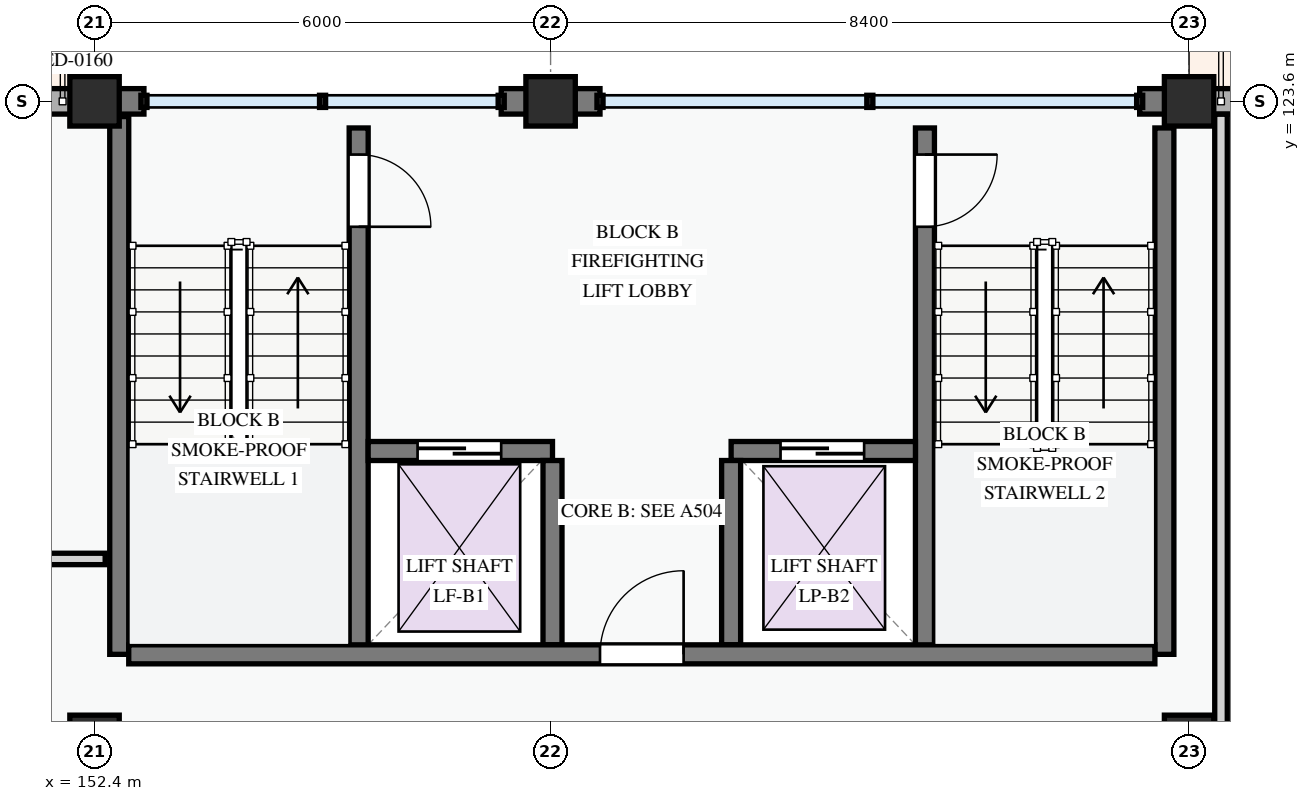
"""IFC4 building model, lengths in metres.
Left out: names, types, materials, properties, quantities, classifications, styles, units other than length and angle.
Written with IfcOpenShell. Run it as: python <this file> out.ifc"""

import sys

from ifc_helpers import new_model, si_unit, direction, frame, frame_2d, origin, origin_2d, place, context, subcontext, project, spatial, rectangle, extrude, element, fill, save


model = new_model("IFC4")
c1 = context("Model", 3, precision=1e-05, world=origin(), true_north=direction((0.0, 1.0)))
c2 = subcontext(c1, "Body", "Model", "MODEL_VIEW")
j1 = project(units=[si_unit("LENGTHUNIT", "METRE"), si_unit("PLANEANGLEUNIT", "RADIAN")], contexts=[c1])
p1 = place(None, origin())
s1 = spatial("IfcSite", under=j1, at=p1, CompositionType="ELEMENT")
p2 = place(p1, origin())
s2 = spatial("IfcBuilding", under=s1, at=p2, CompositionType="ELEMENT")
p3 = place(p2, frame((0.0, 0.0, 14.7)))
s3 = spatial("IfcBuildingStorey", under=s2, at=p3, CompositionType="ELEMENT", Elevation=14.7)
for number, where, z_axis, x_axis in (
    (1, (152.4, 115.2, 0.0), (0.0, 0.0, 1.0), (1.0, 0.0, 0.0)),
    (2, (152.4, 123.6, 0.0), (0.0, 0.0, 1.0), (1.0, 0.0, 0.0)),
    (3, (158.4, 123.6, 0.0), (0.0, 0.0, 1.0), (1.0, 0.0, 0.0)),
    (4, (166.8, 115.2, 0.0), (0.0, 0.0, 1.0), (1.0, 0.0, 0.0)),
    (5, (166.8, 123.6, 0.0), (0.0, 0.0, 1.0), (1.0, 0.0, 0.0)),
):
    element("IfcColumn", number, at=place(p3, frame(where, z_axis=z_axis, x_axis=x_axis)), inside=s3, PredefinedType="COLUMN", context=c2, shape_type="SweptSolid", body=[
        extrude(rectangle(XDim=0.65, YDim=0.65, at=origin_2d()), origin(), (0.0, 0.0, 1.0), 3.3),
    ])
p4 = place(p3, frame((174.0, 123.6, 0.0), z_axis=(0.0, 0.0, 1.0), x_axis=(-1.0, 0.0, 0.0)))
e6 = element("IfcWall", 6, at=p4, inside=s3, PredefinedType="STANDARD", context=c2, shape_type="SweptSolid", body=[
    extrude(rectangle(XDim=7.2, YDim=0.335, at=frame_2d((3.6, 0.0))), origin(), (0.0, 0.0, 1.0), 2.345),
])
p5 = place(p4, frame((0.62, 0.0, 0.0)))
e7 = element("IfcOpeningElement", 7, at=p5, cuts=e6, PredefinedType="OPENING", context=c2, shape_type="SweptSolid", body=[
    extrude(rectangle(XDim=1.05, YDim=2.15, at=frame_2d((0.525, 1.075))), frame((0.0, 0.177, 0.0), z_axis=(0.0, -1.0, 0.0), x_axis=(1.0, 0.0, 0.0)), (0.0, 0.0, 1.0), 0.355),
])
p6 = place(p4, frame((2.47, 0.0, 0.78)))
e8 = element("IfcOpeningElement", 8, at=p6, cuts=e6, PredefinedType="OPENING", context=c2, shape_type="SweptSolid", body=[
    extrude(rectangle(XDim=1.1, YDim=1.3, at=frame_2d((0.55, 0.65))), frame((0.0, 0.177, 0.0), z_axis=(0.0, -1.0, 0.0), x_axis=(1.0, 0.0, 0.0)), (0.0, 0.0, 1.0), 0.355),
])
p7 = place(p4, frame((4.955, 0.0, 0.78)))
e9 = element("IfcOpeningElement", 9, at=p7, cuts=e6, PredefinedType="OPENING", context=c2, shape_type="SweptSolid", body=[
    extrude(rectangle(XDim=1.05, YDim=1.2, at=frame_2d((0.525, 0.6))), frame((0.0, 0.177, 0.0), z_axis=(0.0, -1.0, 0.0), x_axis=(1.0, 0.0, 0.0)), (0.0, 0.0, 1.0), 0.355),
])
for number, where, z_axis, x_axis in (
    (10, (166.8, 123.6, 0.0), (0.0, 0.0, 1.0), (-1.0, 0.0, 0.0)),
    (11, (159.05, 123.6, 0.0), (0.0, 0.0, 1.0), (-1.0, 0.0, 0.0)),
):
    element("IfcWall", number, at=place(p3, frame(where, z_axis=z_axis, x_axis=x_axis)), inside=s3, PredefinedType="STANDARD", context=c2, shape_type="SweptSolid", body=[
        extrude(rectangle(XDim=0.65, YDim=0.335, at=frame_2d((0.325, 0.0))), origin(), (0.0, 0.0, 1.0), 3.04),
    ])
p8 = place(p3, frame((158.4, 123.6, 0.0), z_axis=(0.0, 0.0, 1.0), x_axis=(-1.0, 0.0, 0.0)))
e12 = element("IfcWall", 12, at=p8, inside=s3, PredefinedType="STANDARD", context=c2, shape_type="SweptSolid", body=[
    extrude(rectangle(XDim=0.65, YDim=0.335, at=frame_2d((0.325, 0.0))), origin(), (0.0, 0.0, 1.0), 3.04),
])
p9 = place(p3, frame((153.05, 123.6, 0.0), z_axis=(0.0, 0.0, 1.0), x_axis=(-1.0, 0.0, 0.0)))
e13 = element("IfcWall", 13, at=p9, inside=s3, PredefinedType="STANDARD", context=c2, shape_type="SweptSolid", body=[
    extrude(rectangle(XDim=0.65, YDim=0.335, at=frame_2d((0.325, 0.0))), origin(), (0.0, 0.0, 1.0), 3.04),
])
p10 = place(p3, frame((152.4, 123.6, 0.0), z_axis=(0.0, 0.0, 1.0), x_axis=(-1.0, 0.0, 0.0)))
e14 = element("IfcWall", 14, at=p10, inside=s3, PredefinedType="STANDARD", context=c2, shape_type="SweptSolid", body=[
    extrude(rectangle(XDim=8.4, YDim=0.335, at=frame_2d((4.2, 0.0))), origin(), (0.0, 0.0, 1.0), 2.345),
])
p11 = place(p10, frame((0.62, 0.0, 0.0)))
e15 = element("IfcOpeningElement", 15, at=p11, cuts=e14, PredefinedType="OPENING", context=c2, shape_type="SweptSolid", body=[
    extrude(rectangle(XDim=1.25, YDim=2.2, at=frame_2d((0.625, 1.1))), frame((0.0, 0.177, 0.0), z_axis=(0.0, -1.0, 0.0), x_axis=(1.0, 0.0, 0.0)), (0.0, 0.0, 1.0), 0.355),
])
p12 = place(p10, frame((3.052, 0.0, 0.78)))
e16 = element("IfcOpeningElement", 16, at=p12, cuts=e14, PredefinedType="OPENING", context=c2, shape_type="SweptSolid", body=[
    extrude(rectangle(XDim=0.95, YDim=1.15, at=frame_2d((0.475, 0.575))), frame((0.0, 0.177, 0.0), z_axis=(0.0, -1.0, 0.0), x_axis=(1.0, 0.0, 0.0)), (0.0, 0.0, 1.0), 0.355),
])
p13 = place(p10, frame((5.843, 0.0, 0.78)))
e17 = element("IfcOpeningElement", 17, at=p13, cuts=e14, PredefinedType="OPENING", context=c2, shape_type="SweptSolid", body=[
    extrude(rectangle(XDim=1.52, YDim=1.42, at=frame_2d((0.76, 0.71))), frame((0.0, 0.177, 0.0), z_axis=(0.0, -1.0, 0.0), x_axis=(1.0, 0.0, 0.0)), (0.0, 0.0, 1.0), 0.355),
])
p14 = place(p3, frame((155.875, 123.25, 0.0), z_axis=(0.0, 0.0, 1.0), x_axis=(0.0, -1.0, 0.0)))
e18 = element("IfcWall", 18, at=p14, inside=s3, PredefinedType="SHEAR", context=c2, shape_type="SweptSolid", body=[
    extrude(rectangle(XDim=6.925, YDim=0.25, at=frame_2d((3.462, 0.0))), origin(), (0.0, 0.0, 1.0), 3.0),
])
p15 = place(p14, frame((0.35, 0.0, 0.0)))
e19 = element("IfcOpeningElement", 19, at=p15, cuts=e18, PredefinedType="OPENING", context=c2, shape_type="SweptSolid", body=[
    extrude(rectangle(XDim=0.95, YDim=2.1, at=frame_2d((0.475, 1.05))), frame((0.0, 0.135, 0.0), z_axis=(0.0, -1.0, 0.0), x_axis=(1.0, 0.0, 0.0)), (0.0, 0.0, 1.0), 0.27),
])
p16 = place(p3, frame((152.725, 123.4, 0.0), z_axis=(0.0, 0.0, 1.0), x_axis=(0.0, -1.0, 0.0)))
e20 = element("IfcWall", 20, at=p16, inside=s3, PredefinedType="SHEAR", context=c2, shape_type="SweptSolid", body=[
    extrude(rectangle(XDim=7.075, YDim=0.25, at=frame_2d((3.538, 0.0))), origin(), (0.0, 0.0, 1.0), 3.0),
])
p17 = place(p3, frame((166.475, 123.25, 0.0), z_axis=(0.0, 0.0, 1.0), x_axis=(0.0, -1.0, 0.0)))
e21 = element("IfcWall", 21, at=p17, inside=s3, PredefinedType="SHEAR", context=c2, shape_type="SweptSolid", body=[
    extrude(rectangle(XDim=6.925, YDim=0.25, at=frame_2d((3.462, 0.0))), origin(), (0.0, 0.0, 1.0), 3.0),
])
p18 = place(p3, frame((163.325, 123.25, 0.0), z_axis=(0.0, 0.0, 1.0), x_axis=(0.0, -1.0, 0.0)))
e22 = element("IfcWall", 22, at=p18, inside=s3, PredefinedType="SHEAR", context=c2, shape_type="SweptSolid", body=[
    extrude(rectangle(XDim=6.925, YDim=0.25, at=frame_2d((3.462, 0.0))), origin(), (0.0, 0.0, 1.0), 3.0),
])
p19 = place(p18, frame((0.35, 0.0, 0.0)))
e23 = element("IfcOpeningElement", 23, at=p19, cuts=e22, PredefinedType="OPENING", context=c2, shape_type="SweptSolid", body=[
    extrude(rectangle(XDim=0.95, YDim=2.1, at=frame_2d((0.475, 1.05))), frame((0.0, 0.135, 0.0), z_axis=(0.0, -1.0, 0.0), x_axis=(1.0, 0.0, 0.0)), (0.0, 0.0, 1.0), 0.27),
])
p20 = place(p3, frame((156.0, 119.0, 0.0), z_axis=(0.0, 0.0, 1.0), x_axis=(1.0, 0.0, 0.0)))
e24 = element("IfcWall", 24, at=p20, inside=s3, PredefinedType="SHEAR", context=c2, shape_type="SweptSolid", body=[
    extrude(rectangle(XDim=2.425, YDim=0.25, at=frame_2d((1.212, 0.0))), origin(), (0.0, 0.0, 1.0), 3.0),
])
p21 = place(p20, frame((0.65, 0.0, 0.0)))
e25 = element("IfcOpeningElement", 25, at=p21, cuts=e24, PredefinedType="OPENING", context=c2, shape_type="SweptSolid", body=[
    extrude(rectangle(XDim=1.1, YDim=2.15, at=frame_2d((0.55, 1.075))), frame((0.0, 0.135, 0.0), z_axis=(0.0, -1.0, 0.0), x_axis=(1.0, 0.0, 0.0)), (0.0, 0.0, 1.0), 0.27),
])
p22 = place(p3, frame((160.775, 119.0, 0.0), z_axis=(0.0, 0.0, 1.0), x_axis=(1.0, 0.0, 0.0)))
e26 = element("IfcWall", 26, at=p22, inside=s3, PredefinedType="SHEAR", context=c2, shape_type="SweptSolid", body=[
    extrude(rectangle(XDim=2.425, YDim=0.25, at=frame_2d((1.212, 0.0))), origin(), (0.0, 0.0, 1.0), 3.0),
])
p23 = place(p22, frame((0.65, 0.0, 0.0)))
e27 = element("IfcOpeningElement", 27, at=p23, cuts=e26, PredefinedType="OPENING", context=c2, shape_type="SweptSolid", body=[
    extrude(rectangle(XDim=1.1, YDim=2.15, at=frame_2d((0.55, 1.075))), frame((0.0, 0.135, 0.0), z_axis=(0.0, -1.0, 0.0), x_axis=(1.0, 0.0, 0.0)), (0.0, 0.0, 1.0), 0.27),
])
for number, where, z_axis, x_axis in (
    (28, (158.425, 118.875, 0.0), (0.0, 0.0, 1.0), (0.0, -1.0, 0.0)),
    (29, (160.775, 118.875, 0.0), (0.0, 0.0, 1.0), (0.0, -1.0, 0.0)),
):
    element("IfcWall", number, at=place(p3, frame(where, z_axis=z_axis, x_axis=x_axis)), inside=s3, PredefinedType="SHEAR", context=c2, shape_type="SweptSolid", body=[
        extrude(rectangle(XDim=2.425, YDim=0.25, at=frame_2d((1.212, 0.0))), origin(), (0.0, 0.0, 1.0), 3.0),
    ])
p24 = place(p3, frame((152.85, 116.325, 0.0), z_axis=(0.0, 0.0, 1.0), x_axis=(1.0, 0.0, 0.0)))
e30 = element("IfcWall", 30, at=p24, inside=s3, PredefinedType="SHEAR", context=c2, shape_type="SweptSolid", body=[
    extrude(rectangle(XDim=13.5, YDim=0.25, at=frame_2d((6.75, 0.0))), origin(), (0.0, 0.0, 1.0), 3.0),
])
p25 = place(p24, frame((6.2, 0.0, 0.0)))
e31 = element("IfcOpeningElement", 31, at=p25, cuts=e30, PredefinedType="OPENING", context=c2, shape_type="SweptSolid", body=[
    extrude(rectangle(XDim=1.1, YDim=2.15, at=frame_2d((0.55, 1.075))), frame((0.0, 0.135, 0.0), z_axis=(0.0, -1.0, 0.0), x_axis=(1.0, 0.0, 0.0)), (0.0, 0.0, 1.0), 0.27),
])
p26 = place(p3, frame((80.57, 117.58, 0.0), z_axis=(0.0, 0.0, 1.0), x_axis=(1.0, 0.0, 0.0)))
e32 = element("IfcWall", 32, at=p26, inside=s3, PredefinedType="PARTITIONING", context=c2, shape_type="SweptSolid", body=[
    extrude(rectangle(XDim=71.97, YDim=0.15, at=frame_2d((35.985, 0.0))), origin(), (0.0, 0.0, 1.0), 3.0),
])
p27 = place(p26, frame((9.279, 0.0, 0.0)))
e33 = element("IfcOpeningElement", 33, at=p27, cuts=e32, PredefinedType="OPENING", context=c2, shape_type="SweptSolid", body=[
    extrude(rectangle(XDim=0.92, YDim=2.1, at=frame_2d((0.46, 1.05))), frame((0.0, 0.085, 0.0), z_axis=(0.0, -1.0, 0.0), x_axis=(1.0, 0.0, 0.0)), (0.0, 0.0, 1.0), 0.17),
])
p28 = place(p26, frame((23.985, 0.0, 0.0)))
e34 = element("IfcOpeningElement", 34, at=p28, cuts=e32, PredefinedType="OPENING", context=c2, shape_type="SweptSolid", body=[
    extrude(rectangle(XDim=0.96, YDim=2.12, at=frame_2d((0.48, 1.06))), frame((0.0, 0.085, 0.0), z_axis=(0.0, -1.0, 0.0), x_axis=(1.0, 0.0, 0.0)), (0.0, 0.0, 1.0), 0.17),
])
p29 = place(p26, frame((52.695, 0.0, 0.0)))
e35 = element("IfcOpeningElement", 35, at=p29, cuts=e32, PredefinedType="OPENING", context=c2, shape_type="SweptSolid", body=[
    extrude(rectangle(XDim=0.92, YDim=2.1, at=frame_2d((0.46, 1.05))), frame((0.0, 0.085, 0.0), z_axis=(0.0, -1.0, 0.0), x_axis=(1.0, 0.0, 0.0)), (0.0, 0.0, 1.0), 0.17),
])
p30 = place(p3, frame((167.22, 109.452, 0.0), z_axis=(0.0, 0.0, 1.0), x_axis=(0.0, 1.0, 0.0)))
e36 = element("IfcWall", 36, at=p30, inside=s3, PredefinedType="PARTITIONING", context=c2, shape_type="SweptSolid", body=[
    extrude(rectangle(XDim=13.979, YDim=0.165, at=frame_2d((6.989, 0.0))), origin(), (0.0, 0.0, 1.0), 2.425),
])
p31 = place(p30, frame((2.438, 0.0, 0.0)))
e37 = element("IfcOpeningElement", 37, at=p31, cuts=e36, PredefinedType="OPENING", context=c2, shape_type="SweptSolid", body=[
    extrude(rectangle(XDim=0.92, YDim=2.1, at=frame_2d((0.46, 1.05))), frame((0.0, 0.093, 0.0), z_axis=(0.0, -1.0, 0.0), x_axis=(1.0, 0.0, 0.0)), (0.0, 0.0, 1.0), 0.185),
])
p32 = place(p15, origin())
e38 = element("IfcDoor", 38, at=p32, inside=s3, OperationType="SINGLE_SWING_RIGHT", PredefinedType="DOOR", context=c2, shape_type="SweptSolid", body=[
    extrude(rectangle(XDim=0.95, YDim=2.1, at=frame_2d((0.475, 1.05))), frame((0.0, 0.025, 0.0), z_axis=(0.0, -1.0, 0.0), x_axis=(1.0, 0.0, 0.0)), (0.0, 0.0, 1.0), 0.05),
])
fill(e19, e38)
p33 = place(p19, origin())
e39 = element("IfcDoor", 39, at=p33, inside=s3, OperationType="SINGLE_SWING_LEFT", PredefinedType="DOOR", context=c2, shape_type="SweptSolid", body=[
    extrude(rectangle(XDim=0.95, YDim=2.1, at=frame_2d((0.475, 1.05))), frame((0.0, 0.025, 0.0), z_axis=(0.0, -1.0, 0.0), x_axis=(1.0, 0.0, 0.0)), (0.0, 0.0, 1.0), 0.05),
])
fill(e23, e39)
p34 = place(p21, origin())
e40 = element("IfcDoor", 40, at=p34, inside=s3, OperationType="SLIDING_TO_LEFT", PredefinedType="DOOR", context=c2, shape_type="SweptSolid", body=[
    extrude(rectangle(XDim=1.1, YDim=2.15, at=frame_2d((0.55, 1.075))), frame((0.0, 0.025, 0.0), z_axis=(0.0, -1.0, 0.0), x_axis=(1.0, 0.0, 0.0)), (0.0, 0.0, 1.0), 0.05),
])
fill(e25, e40)
p35 = place(p23, origin())
e41 = element("IfcDoor", 41, at=p35, inside=s3, OperationType="SLIDING_TO_LEFT", PredefinedType="DOOR", context=c2, shape_type="SweptSolid", body=[
    extrude(rectangle(XDim=1.1, YDim=2.15, at=frame_2d((0.55, 1.075))), frame((0.0, 0.025, 0.0), z_axis=(0.0, -1.0, 0.0), x_axis=(1.0, 0.0, 0.0)), (0.0, 0.0, 1.0), 0.05),
])
fill(e27, e41)
p36 = place(p25, origin())
e42 = element("IfcDoor", 42, at=p36, inside=s3, OperationType="SINGLE_SWING_RIGHT", PredefinedType="DOOR", context=c2, shape_type="SweptSolid", body=[
    extrude(rectangle(XDim=1.1, YDim=2.15, at=frame_2d((0.55, 1.075))), frame((0.0, 0.025, 0.0), z_axis=(0.0, -1.0, 0.0), x_axis=(1.0, 0.0, 0.0)), (0.0, 0.0, 1.0), 0.05),
])
fill(e31, e42)
save(model, sys.argv[1])
